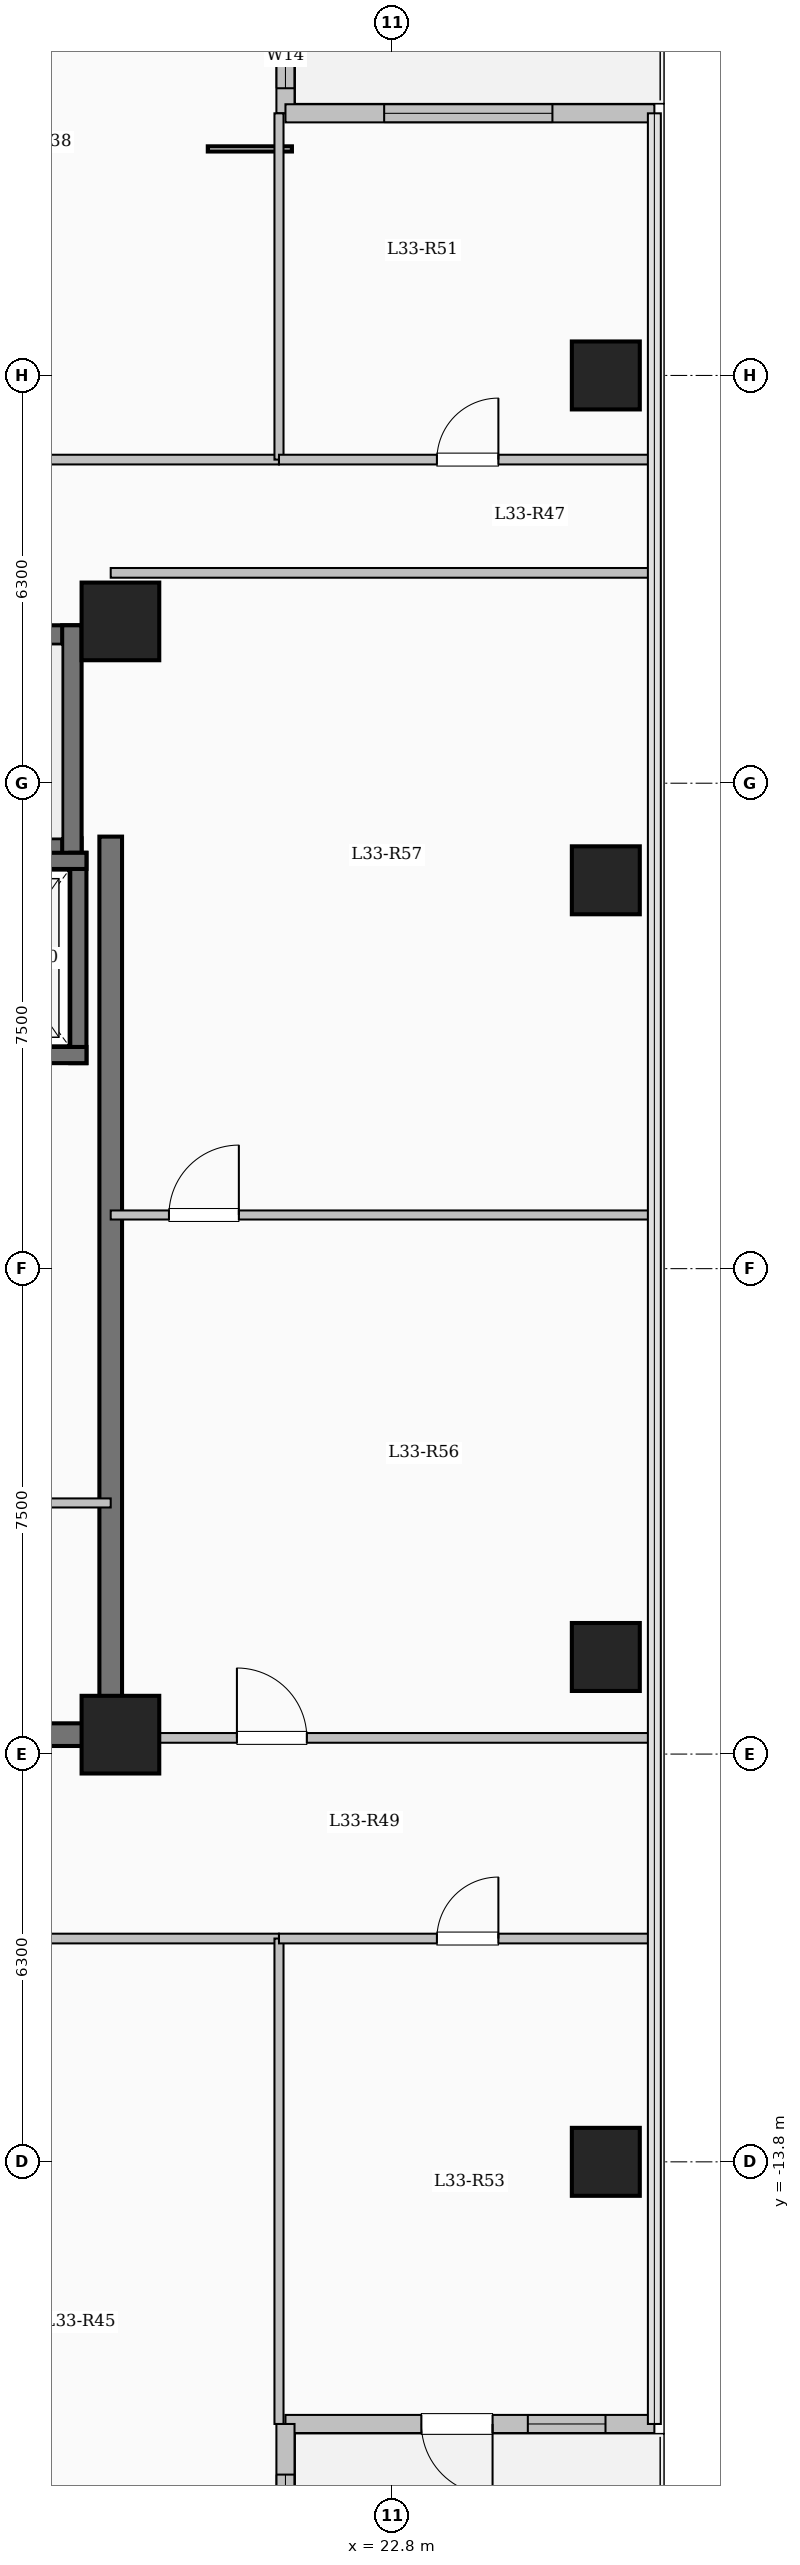
"""IFC4 building model, lengths in metres.
Left out: names, types, materials, properties, quantities, classifications, styles, units other than length and angle.
Written with IfcOpenShell. Run it as: python <this file> out.ifc"""

import sys

from ifc_helpers import new_model, si_unit, direction, frame, frame_2d, origin, origin_2d, place, context, subcontext, project, spatial, rectangle, extrude, element, fill, save


model = new_model("IFC4")
c1 = context("Model", 3, precision=1e-05, world=origin(), true_north=direction((0.0, 1.0)))
c2 = subcontext(c1, "Body", "Model", "MODEL_VIEW")
j1 = project(units=[si_unit("LENGTHUNIT", "METRE"), si_unit("PLANEANGLEUNIT", "RADIAN")], contexts=[c1])
p1 = place(None, origin())
s1 = spatial("IfcSite", under=j1, at=p1, CompositionType="ELEMENT")
p2 = place(p1, origin())
s2 = spatial("IfcBuilding", under=s1, at=p2, CompositionType="ELEMENT")
p3 = place(p2, frame((0.0, 0.0, 123.0)))
s3 = spatial("IfcBuildingStorey", under=s2, at=p3, CompositionType="ELEMENT", Elevation=123.0)
for number, where, z_axis, x_axis in (
    (1, (18.6, -7.2, 0.0), (0.0, 0.0, 1.0), (1.0, 0.0, 0.0)),
    (2, (18.6, 10.0, 0.0), (0.0, 0.0, 1.0), (1.0, 0.0, 0.0)),
):
    element("IfcColumn", number, at=place(p3, frame(where, z_axis=z_axis, x_axis=x_axis)), inside=s3, PredefinedType="COLUMN", context=c2, shape_type="SweptSolid", body=[
        extrude(rectangle(XDim=1.2, YDim=1.2, at=origin_2d()), origin(), (0.0, 0.0, 1.0), 4.5),
    ])
for number, where, z_axis, x_axis in (
    (3, (26.1, -13.8, 0.0), (0.0, 0.0, 1.0), (1.0, 0.0, 0.0)),
    (4, (26.1, -6.0, 0.0), (0.0, 0.0, 1.0), (1.0, 0.0, 0.0)),
    (5, (26.1, 6.0, 0.0), (0.0, 0.0, 1.0), (1.0, 0.0, 0.0)),
    (6, (26.1, 13.8, 0.0), (0.0, 0.0, 1.0), (1.0, 0.0, 0.0)),
):
    element("IfcColumn", number, at=place(p3, frame(where, z_axis=z_axis, x_axis=x_axis)), inside=s3, PredefinedType="COLUMN", context=c2, shape_type="SweptSolid", body=[
        extrude(rectangle(XDim=1.05, YDim=1.05, at=origin_2d()), origin(), (0.0, 0.0, 1.0), 4.5),
    ])
p4 = place(p3, frame((21.15, 22.05, 0.0), z_axis=(0.0, 0.0, 1.0), x_axis=(0.0, -1.0, 0.0)))
e7 = element("IfcWall", 7, at=p4, inside=s3, PredefinedType="SOLIDWALL", context=c2, shape_type="SweptSolid", body=[
    extrude(rectangle(XDim=4.2, YDim=0.28, at=frame_2d((2.1, 0.0))), origin(), (0.0, 0.0, 1.0), 4.2),
])
p5 = place(p4, frame((1.5, 0.0, 0.0)))
e8 = element("IfcOpeningElement", 8, at=p5, cuts=e7, PredefinedType="OPENING", context=c2, shape_type="SweptSolid", body=[
    extrude(rectangle(XDim=1.1, YDim=2.2, at=frame_2d((0.55, 1.1))), frame((0.0, 0.15, 0.0), z_axis=(0.0, -1.0, 0.0), x_axis=(1.0, 0.0, 0.0)), (0.0, 0.0, 1.0), 0.3),
])
p6 = place(p4, frame((2.812, 0.0, 0.95)))
e9 = element("IfcOpeningElement", 9, at=p6, cuts=e7, PredefinedType="OPENING", context=c2, shape_type="SweptSolid", body=[
    extrude(rectangle(XDim=1.0, YDim=1.5, at=frame_2d((0.5, 0.75))), frame((0.0, 0.15, 0.0), z_axis=(0.0, -1.0, 0.0), x_axis=(1.0, 0.0, 0.0)), (0.0, 0.0, 1.0), 0.3),
])
p7 = place(p3, frame((21.15, 17.85, 0.0), z_axis=(0.0, 0.0, 1.0), x_axis=(1.0, 0.0, 0.0)))
e10 = element("IfcWall", 10, at=p7, inside=s3, PredefinedType="SOLIDWALL", context=c2, shape_type="SweptSolid", body=[
    extrude(rectangle(XDim=5.7, YDim=0.28, at=frame_2d((2.85, 0.0))), origin(), (0.0, 0.0, 1.0), 4.2),
])
p8 = place(p7, frame((1.525, 0.0, 0.85)))
e11 = element("IfcOpeningElement", 11, at=p8, cuts=e10, PredefinedType="OPENING", context=c2, shape_type="SweptSolid", body=[
    extrude(rectangle(XDim=2.6, YDim=2.4, at=frame_2d((1.3, 1.2))), frame((0.0, 0.15, 0.0), z_axis=(0.0, -1.0, 0.0), x_axis=(1.0, 0.0, 0.0)), (0.0, 0.0, 1.0), 0.3),
])
p9 = place(p3, frame((26.85, -17.85, 0.0), z_axis=(0.0, 0.0, 1.0), x_axis=(-1.0, 0.0, 0.0)))
e12 = element("IfcWall", 12, at=p9, inside=s3, PredefinedType="SOLIDWALL", context=c2, shape_type="SweptSolid", body=[
    extrude(rectangle(XDim=5.7, YDim=0.28, at=frame_2d((2.85, 0.0))), origin(), (0.0, 0.0, 1.0), 4.2),
])
p10 = place(p9, frame((2.5, 0.0, 0.0)))
e13 = element("IfcOpeningElement", 13, at=p10, cuts=e12, PredefinedType="OPENING", context=c2, shape_type="SweptSolid", body=[
    extrude(rectangle(XDim=1.1, YDim=2.2, at=frame_2d((0.55, 1.1))), frame((0.0, 0.15, 0.0), z_axis=(0.0, -1.0, 0.0), x_axis=(1.0, 0.0, 0.0)), (0.0, 0.0, 1.0), 0.3),
])
p11 = place(p9, frame((0.755, 0.0, 0.95)))
e14 = element("IfcOpeningElement", 14, at=p11, cuts=e12, PredefinedType="OPENING", context=c2, shape_type="SweptSolid", body=[
    extrude(rectangle(XDim=1.2, YDim=1.5, at=frame_2d((0.6, 0.75))), frame((0.0, 0.15, 0.0), z_axis=(0.0, -1.0, 0.0), x_axis=(1.0, 0.0, 0.0)), (0.0, 0.0, 1.0), 0.3),
])
p12 = place(p3, frame((21.15, -17.85, 0.0), z_axis=(0.0, 0.0, 1.0), x_axis=(0.0, -1.0, 0.0)))
e15 = element("IfcWall", 15, at=p12, inside=s3, PredefinedType="SOLIDWALL", context=c2, shape_type="SweptSolid", body=[
    extrude(rectangle(XDim=4.2, YDim=0.28, at=frame_2d((2.1, 0.0))), origin(), (0.0, 0.0, 1.0), 4.2),
])
p13 = place(p12, frame((0.782, 0.0, 0.85)))
e16 = element("IfcOpeningElement", 16, at=p13, cuts=e15, PredefinedType="OPENING", context=c2, shape_type="SweptSolid", body=[
    extrude(rectangle(XDim=2.6, YDim=2.4, at=frame_2d((1.3, 1.2))), frame((0.0, 0.15, 0.0), z_axis=(0.0, -1.0, 0.0), x_axis=(1.0, 0.0, 0.0)), (0.0, 0.0, 1.0), 0.3),
])
p14 = place(p3, frame((10.0, 9.79, 0.0), z_axis=(0.0, 0.0, 1.0), x_axis=(1.0, 0.0, 0.0)))
e17 = element("IfcWall", 17, at=p14, inside=s3, PredefinedType="SHEAR", context=c2, shape_type="SweptSolid", body=[
    extrude(rectangle(XDim=8.0, YDim=0.3, at=frame_2d((4.0, 0.0))), origin(), (0.0, 0.0, 1.0), 4.5),
])
p15 = place(p3, frame((10.0, 6.5, 0.0), z_axis=(0.0, 0.0, 1.0), x_axis=(1.0, 0.0, 0.0)))
e18 = element("IfcWall", 18, at=p15, inside=s3, PredefinedType="SHEAR", context=c2, shape_type="SweptSolid", body=[
    extrude(rectangle(XDim=8.0, YDim=0.3, at=frame_2d((4.0, 0.0))), origin(), (0.0, 0.0, 1.0), 4.5),
])
p16 = place(p15, frame((0.55, 0.0, 0.0)))
e19 = element("IfcOpeningElement", 19, at=p16, cuts=e18, PredefinedType="OPENING", context=c2, shape_type="SweptSolid", body=[
    extrude(rectangle(XDim=1.0, YDim=2.15, at=frame_2d((0.5, 1.075))), frame((0.0, 0.16, 0.0), z_axis=(0.0, -1.0, 0.0), x_axis=(1.0, 0.0, 0.0)), (0.0, 0.0, 1.0), 0.32),
])
p17 = place(p3, frame((17.85, 6.35, 0.0), z_axis=(0.0, 0.0, 1.0), x_axis=(0.0, 1.0, 0.0)))
e20 = element("IfcWall", 20, at=p17, inside=s3, PredefinedType="SHEAR", context=c2, shape_type="SweptSolid", body=[
    extrude(rectangle(XDim=3.59, YDim=0.3, at=frame_2d((1.795, 0.0))), origin(), (0.0, 0.0, 1.0), 4.5),
])
p18 = place(p3, frame((17.95, 3.175, 0.0), z_axis=(0.0, 0.0, 1.0), x_axis=(0.0, 1.0, 0.0)))
e21 = element("IfcWall", 21, at=p18, inside=s3, PredefinedType="SHEAR", context=c2, shape_type="SweptSolid", body=[
    extrude(rectangle(XDim=3.25, YDim=0.25, at=frame_2d((1.625, 0.0))), origin(), (0.0, 0.0, 1.0), 4.5),
])
for number, where, z_axis, x_axis in (
    (22, (15.525, 3.3, 0.0), (0.0, 0.0, 1.0), (1.0, 0.0, 0.0)),
    (23, (15.525, 6.3, 0.0), (0.0, 0.0, 1.0), (1.0, 0.0, 0.0)),
):
    element("IfcWall", number, at=place(p3, frame(where, z_axis=z_axis, x_axis=x_axis)), inside=s3, PredefinedType="SHEAR", context=c2, shape_type="SweptSolid", body=[
        extrude(rectangle(XDim=2.55, YDim=0.25, at=frame_2d((1.275, 0.0))), origin(), (0.0, 0.0, 1.0), 4.5),
    ])
p19 = place(p3, frame((18.45, -7.375, 0.0), z_axis=(0.0, 0.0, 1.0), x_axis=(0.0, 1.0, 0.0)))
e24 = element("IfcWall", 24, at=p19, inside=s3, PredefinedType="SHEAR", context=c2, shape_type="SweptSolid", body=[
    extrude(rectangle(XDim=14.05, YDim=0.35, at=frame_2d((7.025, 0.0))), origin(), (0.0, 0.0, 1.0), 4.5),
])
p20 = place(p3, frame((10.075, -7.2, 0.0), z_axis=(0.0, 0.0, 1.0), x_axis=(1.0, 0.0, 0.0)))
e25 = element("IfcWall", 25, at=p20, inside=s3, PredefinedType="SHEAR", context=c2, shape_type="SweptSolid", body=[
    extrude(rectangle(XDim=8.55, YDim=0.35, at=frame_2d((4.275, 0.0))), origin(), (0.0, 0.0, 1.0), 4.5),
])
p21 = place(p3, frame((15.4, -3.62, 0.0), z_axis=(0.0, 0.0, 1.0), x_axis=(1.0, 0.0, 0.0)))
e26 = element("IfcWall", 26, at=p21, inside=s3, PredefinedType="PARTITIONING", context=c2, shape_type="SweptSolid", body=[
    extrude(rectangle(XDim=3.05, YDim=0.14, at=frame_2d((1.525, 0.0))), origin(), (0.0, 0.0, 1.0), 4.2),
])
p22 = place(p21, frame((1.05, 0.0, 0.0)))
e27 = element("IfcOpeningElement", 27, at=p22, cuts=e26, PredefinedType="OPENING", context=c2, shape_type="SweptSolid", body=[
    extrude(rectangle(XDim=0.9, YDim=2.08, at=frame_2d((0.45, 1.04))), frame((0.0, 0.08, 0.0), z_axis=(0.0, -1.0, 0.0), x_axis=(1.0, 0.0, 0.0)), (0.0, 0.0, 1.0), 0.16),
])
p23 = place(p3, frame((3.85, 12.5, 0.0), z_axis=(0.0, 0.0, 1.0), x_axis=(1.0, 0.0, 0.0)))
e28 = element("IfcWall", 28, at=p23, inside=s3, PredefinedType="PARTITIONING", context=c2, shape_type="SweptSolid", body=[
    extrude(rectangle(XDim=17.2, YDim=0.15, at=frame_2d((8.6, 0.0))), origin(), (0.0, 0.0, 1.0), 4.2),
])
p24 = place(p23, frame((0.8, 0.0, 0.0)))
e29 = element("IfcOpeningElement", 29, at=p24, cuts=e28, PredefinedType="OPENING", context=c2, shape_type="SweptSolid", body=[
    extrude(rectangle(XDim=0.95, YDim=2.15, at=frame_2d((0.475, 1.075))), frame((0.0, 0.085, 0.0), z_axis=(0.0, -1.0, 0.0), x_axis=(1.0, 0.0, 0.0)), (0.0, 0.0, 1.0), 0.17),
])
p25 = place(p23, frame((3.6, 0.0, 0.0)))
e30 = element("IfcOpeningElement", 30, at=p25, cuts=e28, PredefinedType="OPENING", context=c2, shape_type="SweptSolid", body=[
    extrude(rectangle(XDim=0.95, YDim=2.15, at=frame_2d((0.475, 1.075))), frame((0.0, 0.085, 0.0), z_axis=(0.0, -1.0, 0.0), x_axis=(1.0, 0.0, 0.0)), (0.0, 0.0, 1.0), 0.17),
])
p26 = place(p23, frame((6.55, 0.0, 0.0)))
e31 = element("IfcOpeningElement", 31, at=p26, cuts=e28, PredefinedType="OPENING", context=c2, shape_type="SweptSolid", body=[
    extrude(rectangle(XDim=1.08, YDim=2.15, at=frame_2d((0.54, 1.075))), frame((0.0, 0.085, 0.0), z_axis=(0.0, -1.0, 0.0), x_axis=(1.0, 0.0, 0.0)), (0.0, 0.0, 1.0), 0.17),
])
p27 = place(p23, frame((10.793, 0.0, 0.0)))
e32 = element("IfcOpeningElement", 32, at=p27, cuts=e28, PredefinedType="OPENING", context=c2, shape_type="SweptSolid", body=[
    extrude(rectangle(XDim=1.2, YDim=2.15, at=frame_2d((0.6, 1.075))), frame((0.0, 0.085, 0.0), z_axis=(0.0, -1.0, 0.0), x_axis=(1.0, 0.0, 0.0)), (0.0, 0.0, 1.0), 0.17),
])
p28 = place(p3, frame((8.55, -10.35, 0.0), z_axis=(0.0, 0.0, 1.0), x_axis=(1.0, 0.0, 0.0)))
e33 = element("IfcWall", 33, at=p28, inside=s3, PredefinedType="PARTITIONING", context=c2, shape_type="SweptSolid", body=[
    extrude(rectangle(XDim=12.5, YDim=0.15, at=frame_2d((6.25, 0.0))), origin(), (0.0, 0.0, 1.0), 4.2),
])
p29 = place(p28, frame((1.1, 0.0, 0.0)))
e34 = element("IfcOpeningElement", 34, at=p29, cuts=e33, PredefinedType="OPENING", context=c2, shape_type="SweptSolid", body=[
    extrude(rectangle(XDim=1.08, YDim=2.15, at=frame_2d((0.54, 1.075))), frame((0.0, 0.085, 0.0), z_axis=(0.0, -1.0, 0.0), x_axis=(1.0, 0.0, 0.0)), (0.0, 0.0, 1.0), 0.17),
])
p30 = place(p28, frame((7.275, 0.0, 0.0)))
e35 = element("IfcOpeningElement", 35, at=p30, cuts=e33, PredefinedType="OPENING", context=c2, shape_type="SweptSolid", body=[
    extrude(rectangle(XDim=1.2, YDim=2.15, at=frame_2d((0.6, 1.075))), frame((0.0, 0.085, 0.0), z_axis=(0.0, -1.0, 0.0), x_axis=(1.0, 0.0, 0.0)), (0.0, 0.0, 1.0), 0.17),
])
p31 = place(p3, frame((18.45, -7.25, 0.0), z_axis=(0.0, 0.0, 1.0), x_axis=(1.0, 0.0, 0.0)))
e36 = element("IfcWall", 36, at=p31, inside=s3, PredefinedType="PARTITIONING", context=c2, shape_type="SweptSolid", body=[
    extrude(rectangle(XDim=8.43, YDim=0.15, at=frame_2d((4.215, 0.0))), origin(), (0.0, 0.0, 1.0), 4.2),
])
p32 = place(p31, frame((1.95, 0.0, 0.0)))
e37 = element("IfcOpeningElement", 37, at=p32, cuts=e36, PredefinedType="OPENING", context=c2, shape_type="SweptSolid", body=[
    extrude(rectangle(XDim=1.08, YDim=2.15, at=frame_2d((0.54, 1.075))), frame((0.0, 0.085, 0.0), z_axis=(0.0, -1.0, 0.0), x_axis=(1.0, 0.0, 0.0)), (0.0, 0.0, 1.0), 0.17),
])
p33 = place(p3, frame((18.45, 10.75, 0.0), z_axis=(0.0, 0.0, 1.0), x_axis=(1.0, 0.0, 0.0)))
e38 = element("IfcWall", 38, at=p33, inside=s3, PredefinedType="PARTITIONING", context=c2, shape_type="SweptSolid", body=[
    extrude(rectangle(XDim=8.43, YDim=0.15, at=frame_2d((4.215, 0.0))), origin(), (0.0, 0.0, 1.0), 4.2),
])
p34 = place(p3, frame((21.05, -17.85, 0.0), z_axis=(0.0, 0.0, 1.0), x_axis=(0.0, 1.0, 0.0)))
e39 = element("IfcWall", 39, at=p34, inside=s3, PredefinedType="PARTITIONING", context=c2, shape_type="SweptSolid", body=[
    extrude(rectangle(XDim=7.5, YDim=0.14, at=frame_2d((3.75, 0.0))), origin(), (0.0, 0.0, 1.0), 4.2),
])
p35 = place(p3, frame((21.05, 12.5, 0.0), z_axis=(0.0, 0.0, 1.0), x_axis=(0.0, 1.0, 0.0)))
e40 = element("IfcWall", 40, at=p35, inside=s3, PredefinedType="PARTITIONING", context=c2, shape_type="SweptSolid", body=[
    extrude(rectangle(XDim=5.35, YDim=0.14, at=frame_2d((2.675, 0.0))), origin(), (0.0, 0.0, 1.0), 4.2),
])
p36 = place(p3, frame((21.05, 12.5, 0.0), z_axis=(0.0, 0.0, 1.0), x_axis=(1.0, 0.0, 0.0)))
e41 = element("IfcWall", 41, at=p36, inside=s3, PredefinedType="PARTITIONING", context=c2, shape_type="SweptSolid", body=[
    extrude(rectangle(XDim=5.83, YDim=0.15, at=frame_2d((2.915, 0.0))), origin(), (0.0, 0.0, 1.0), 4.2),
])
p37 = place(p36, frame((2.44, 0.0, 0.0)))
e42 = element("IfcOpeningElement", 42, at=p37, cuts=e41, PredefinedType="OPENING", context=c2, shape_type="SweptSolid", body=[
    extrude(rectangle(XDim=0.95, YDim=2.15, at=frame_2d((0.475, 1.075))), frame((0.0, 0.085, 0.0), z_axis=(0.0, -1.0, 0.0), x_axis=(1.0, 0.0, 0.0)), (0.0, 0.0, 1.0), 0.17),
])
p38 = place(p3, frame((21.05, -10.35, 0.0), z_axis=(0.0, 0.0, 1.0), x_axis=(1.0, 0.0, 0.0)))
e43 = element("IfcWall", 43, at=p38, inside=s3, PredefinedType="PARTITIONING", context=c2, shape_type="SweptSolid", body=[
    extrude(rectangle(XDim=5.83, YDim=0.15, at=frame_2d((2.915, 0.0))), origin(), (0.0, 0.0, 1.0), 4.2),
])
p39 = place(p38, frame((2.44, 0.0, 0.0)))
e44 = element("IfcOpeningElement", 44, at=p39, cuts=e43, PredefinedType="OPENING", context=c2, shape_type="SweptSolid", body=[
    extrude(rectangle(XDim=0.95, YDim=2.15, at=frame_2d((0.475, 1.075))), frame((0.0, 0.085, 0.0), z_axis=(0.0, -1.0, 0.0), x_axis=(1.0, 0.0, 0.0)), (0.0, 0.0, 1.0), 0.17),
])
p40 = place(p3, frame((18.45, 0.829, 0.0), z_axis=(0.0, 0.0, 1.0), x_axis=(1.0, 0.0, 0.0)))
e45 = element("IfcWall", 45, at=p40, inside=s3, PredefinedType="PARTITIONING", context=c2, shape_type="SweptSolid", body=[
    extrude(rectangle(XDim=8.43, YDim=0.14, at=frame_2d((4.215, 0.0))), origin(), (0.0, 0.0, 1.0), 4.2),
])
p41 = place(p40, frame((0.9, 0.0, 0.0)))
e46 = element("IfcOpeningElement", 46, at=p41, cuts=e45, PredefinedType="OPENING", context=c2, shape_type="SweptSolid", body=[
    extrude(rectangle(XDim=1.08, YDim=2.15, at=frame_2d((0.54, 1.075))), frame((0.0, 0.08, 0.0), z_axis=(0.0, -1.0, 0.0), x_axis=(1.0, 0.0, 0.0)), (0.0, 0.0, 1.0), 0.16),
])
p42 = place(p6, origin())
e47 = element("IfcWindow", 47, at=p42, inside=s3, PartitioningType="SINGLE_PANEL", PredefinedType="WINDOW", context=c2, shape_type="SweptSolid", body=[
    extrude(rectangle(XDim=1.0, YDim=1.5, at=frame_2d((0.5, 0.75))), frame((0.0, 0.03, 0.0), z_axis=(0.0, -1.0, 0.0), x_axis=(1.0, 0.0, 0.0)), (0.0, 0.0, 1.0), 0.06),
])
fill(e9, e47)
p43 = place(p8, origin())
e48 = element("IfcWindow", 48, at=p43, inside=s3, PartitioningType="SINGLE_PANEL", PredefinedType="WINDOW", context=c2, shape_type="SweptSolid", body=[
    extrude(rectangle(XDim=2.6, YDim=2.4, at=frame_2d((1.3, 1.2))), frame((0.0, 0.03, 0.0), z_axis=(0.0, -1.0, 0.0), x_axis=(1.0, 0.0, 0.0)), (0.0, 0.0, 1.0), 0.06),
])
fill(e11, e48)
p44 = place(p10, origin())
e49 = element("IfcDoor", 49, at=p44, inside=s3, OperationType="SINGLE_SWING_LEFT", PredefinedType="DOOR", context=c2, shape_type="SweptSolid", body=[
    extrude(rectangle(XDim=1.1, YDim=2.2, at=frame_2d((0.55, 1.1))), frame((0.0, 0.025, 0.0), z_axis=(0.0, -1.0, 0.0), x_axis=(1.0, 0.0, 0.0)), (0.0, 0.0, 1.0), 0.05),
])
fill(e13, e49)
p45 = place(p11, origin())
e50 = element("IfcWindow", 50, at=p45, inside=s3, PartitioningType="SINGLE_PANEL", PredefinedType="WINDOW", context=c2, shape_type="SweptSolid", body=[
    extrude(rectangle(XDim=1.2, YDim=1.5, at=frame_2d((0.6, 0.75))), frame((0.0, 0.03, 0.0), z_axis=(0.0, -1.0, 0.0), x_axis=(1.0, 0.0, 0.0)), (0.0, 0.0, 1.0), 0.06),
])
fill(e14, e50)
p46 = place(p13, origin())
e51 = element("IfcWindow", 51, at=p46, inside=s3, PartitioningType="SINGLE_PANEL", PredefinedType="WINDOW", context=c2, shape_type="SweptSolid", body=[
    extrude(rectangle(XDim=2.6, YDim=2.4, at=frame_2d((1.3, 1.2))), frame((0.0, 0.03, 0.0), z_axis=(0.0, -1.0, 0.0), x_axis=(1.0, 0.0, 0.0)), (0.0, 0.0, 1.0), 0.06),
])
fill(e16, e51)
p47 = place(p37, origin())
e52 = element("IfcDoor", 52, at=p47, inside=s3, OperationType="SINGLE_SWING_RIGHT", PredefinedType="DOOR", context=c2, shape_type="SweptSolid", body=[
    extrude(rectangle(XDim=0.95, YDim=2.15, at=frame_2d((0.475, 1.075))), frame((0.0, 0.025, 0.0), z_axis=(0.0, -1.0, 0.0), x_axis=(1.0, 0.0, 0.0)), (0.0, 0.0, 1.0), 0.05),
])
fill(e42, e52)
p48 = place(p39, origin())
e53 = element("IfcDoor", 53, at=p48, inside=s3, OperationType="SINGLE_SWING_RIGHT", PredefinedType="DOOR", context=c2, shape_type="SweptSolid", body=[
    extrude(rectangle(XDim=0.95, YDim=2.15, at=frame_2d((0.475, 1.075))), frame((0.0, 0.025, 0.0), z_axis=(0.0, -1.0, 0.0), x_axis=(1.0, 0.0, 0.0)), (0.0, 0.0, 1.0), 0.05),
])
fill(e44, e53)
p49 = place(p32, origin())
e54 = element("IfcDoor", 54, at=p49, inside=s3, OperationType="SINGLE_SWING_LEFT", PredefinedType="DOOR", context=c2, shape_type="SweptSolid", body=[
    extrude(rectangle(XDim=1.08, YDim=2.15, at=frame_2d((0.54, 1.075))), frame((0.0, 0.025, 0.0), z_axis=(0.0, -1.0, 0.0), x_axis=(1.0, 0.0, 0.0)), (0.0, 0.0, 1.0), 0.05),
])
fill(e37, e54)
p50 = place(p41, origin())
e55 = element("IfcDoor", 55, at=p50, inside=s3, OperationType="SINGLE_SWING_RIGHT", PredefinedType="DOOR", context=c2, shape_type="SweptSolid", body=[
    extrude(rectangle(XDim=1.08, YDim=2.15, at=frame_2d((0.54, 1.075))), frame((0.0, 0.025, 0.0), z_axis=(0.0, -1.0, 0.0), x_axis=(1.0, 0.0, 0.0)), (0.0, 0.0, 1.0), 0.05),
])
fill(e46, e55)
save(model, sys.argv[1])
